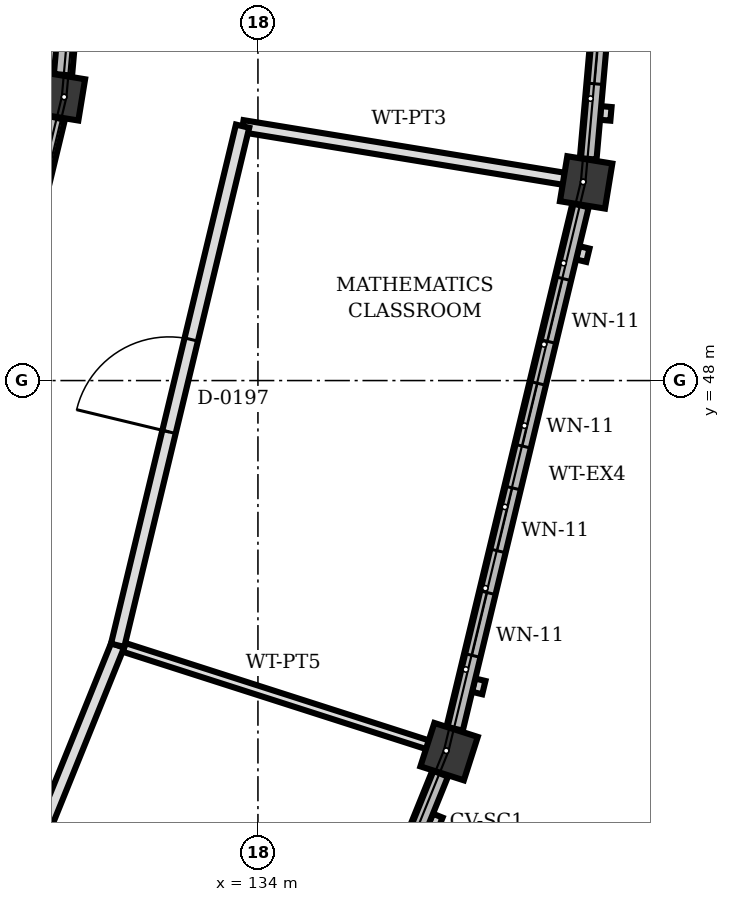
"""IFC4 building model, lengths in metres.
Left out: names, types, materials, properties, quantities, classifications, styles, units other than length and angle.
Written with IfcOpenShell. Run it as: python <this file> out.ifc"""

import sys

from ifc_helpers import new_model, si_unit, direction, frame, frame_2d, origin, origin_2d, place, context, subcontext, project, spatial, rectangle, extrude, element, fill, save


model = new_model("IFC4")
c1 = context("Model", 3, precision=1e-05, world=origin(), true_north=direction((0.0, 1.0)))
c2 = subcontext(c1, "Body", "Model", "MODEL_VIEW")
j1 = project(units=[si_unit("LENGTHUNIT", "METRE"), si_unit("PLANEANGLEUNIT", "RADIAN")], contexts=[c1])
p1 = place(None, origin())
s1 = spatial("IfcSite", under=j1, at=p1, CompositionType="ELEMENT")
p2 = place(p1, origin())
s2 = spatial("IfcBuilding", under=s1, at=p2, CompositionType="ELEMENT")
p3 = place(p2, frame((0.0, 0.0, 8.5)))
s3 = spatial("IfcBuildingStorey", under=s2, at=p3, CompositionType="ELEMENT", Elevation=8.5)
p4 = place(p3, frame((131.41, 51.737, 0.0), z_axis=(0.0, 0.0, 1.0), x_axis=(0.986889540988, -0.161397130983, 0.0)))
e1 = element("IfcColumn", 1, at=p4, inside=s3, PredefinedType="COLUMN", context=c2, shape_type="SweptSolid", body=[
    extrude(rectangle(XDim=0.55, YDim=0.55, at=origin_2d()), origin(), (0.0, 0.0, 1.0), 4.0),
])
for number, where, z_axis, x_axis in (
    (2, (136.515, 43.118, 0.0), (0.0, 0.0, 1.0), (0.952, -0.305, 0.0)),
    (3, (138.318, 50.607, 0.0), (0.0, 0.0, 1.0), (0.987, -0.161, 0.0)),
):
    element("IfcColumn", number, at=place(p3, frame(where, z_axis=z_axis, x_axis=x_axis)), inside=s3, PredefinedType="COLUMN", context=c2, shape_type="SweptSolid", body=[
        extrude(rectangle(XDim=0.6, YDim=0.6, at=origin_2d()), origin(), (0.0, 0.0, 1.0), 4.0),
    ])
p5 = place(p3, frame((136.398, 42.83, 0.0), z_axis=(0.0, 0.0, 1.0), x_axis=(-0.375031251377, -0.92701216847, 0.0)))
e4 = element("IfcWall", 4, at=p5, inside=s3, PredefinedType="SOLIDWALL", context=c2, shape_type="SweptSolid", body=[
    extrude(rectangle(XDim=7.082, YDim=0.22, at=frame_2d((3.541, 0.0))), origin(), (0.0, 0.0, 1.0), 3.192),
])
p6 = place(p5, frame((0.991, 0.0, 0.85)))
e5 = element("IfcOpeningElement", 5, at=p6, cuts=e4, PredefinedType="OPENING", context=c2, shape_type="SweptSolid", body=[
    extrude(rectangle(XDim=0.85, YDim=1.25, at=frame_2d((0.425, 0.625))), frame((0.0, 0.12, 0.0), z_axis=(0.0, -1.0, 0.0), x_axis=(1.0, 0.0, 0.0)), (0.0, 0.0, 1.0), 0.24),
])
p7 = place(p5, frame((2.408, 0.0, 0.85)))
e6 = element("IfcOpeningElement", 6, at=p7, cuts=e4, PredefinedType="OPENING", context=c2, shape_type="SweptSolid", body=[
    extrude(rectangle(XDim=0.85, YDim=1.25, at=frame_2d((0.425, 0.625))), frame((0.0, 0.12, 0.0), z_axis=(0.0, -1.0, 0.0), x_axis=(1.0, 0.0, 0.0)), (0.0, 0.0, 1.0), 0.24),
])
p8 = place(p5, frame((3.824, 0.0, 0.85)))
e7 = element("IfcOpeningElement", 7, at=p8, cuts=e4, PredefinedType="OPENING", context=c2, shape_type="SweptSolid", body=[
    extrude(rectangle(XDim=0.85, YDim=1.25, at=frame_2d((0.425, 0.625))), frame((0.0, 0.12, 0.0), z_axis=(0.0, -1.0, 0.0), x_axis=(1.0, 0.0, 0.0)), (0.0, 0.0, 1.0), 0.24),
])
p9 = place(p5, frame((5.241, 0.0, 0.85)))
e8 = element("IfcOpeningElement", 8, at=p9, cuts=e4, PredefinedType="OPENING", context=c2, shape_type="SweptSolid", body=[
    extrude(rectangle(XDim=0.85, YDim=1.25, at=frame_2d((0.425, 0.625))), frame((0.0, 0.12, 0.0), z_axis=(0.0, -1.0, 0.0), x_axis=(1.0, 0.0, 0.0)), (0.0, 0.0, 1.0), 0.24),
])
p10 = place(p3, frame((138.245, 50.305, 0.0), z_axis=(0.0, 0.0, 1.0), x_axis=(-0.234017027709, -0.972232498296, 0.0)))
e9 = element("IfcWall", 9, at=p10, inside=s3, PredefinedType="SOLIDWALL", context=c2, shape_type="SweptSolid", body=[
    extrude(rectangle(XDim=7.082, YDim=0.22, at=frame_2d((3.541, 0.0))), origin(), (0.0, 0.0, 1.0), 3.192),
])
p11 = place(p10, frame((0.991, 0.0, 0.85)))
e10 = element("IfcOpeningElement", 10, at=p11, cuts=e9, PredefinedType="OPENING", context=c2, shape_type="SweptSolid", body=[
    extrude(rectangle(XDim=0.85, YDim=1.25, at=frame_2d((0.425, 0.625))), frame((0.0, 0.12, 0.0), z_axis=(0.0, -1.0, 0.0), x_axis=(1.0, 0.0, 0.0)), (0.0, 0.0, 1.0), 0.24),
])
p12 = place(p10, frame((2.408, 0.0, 0.85)))
e11 = element("IfcOpeningElement", 11, at=p12, cuts=e9, PredefinedType="OPENING", context=c2, shape_type="SweptSolid", body=[
    extrude(rectangle(XDim=0.85, YDim=1.25, at=frame_2d((0.425, 0.625))), frame((0.0, 0.12, 0.0), z_axis=(0.0, -1.0, 0.0), x_axis=(1.0, 0.0, 0.0)), (0.0, 0.0, 1.0), 0.24),
])
p13 = place(p10, frame((3.824, 0.0, 0.85)))
e12 = element("IfcOpeningElement", 12, at=p13, cuts=e9, PredefinedType="OPENING", context=c2, shape_type="SweptSolid", body=[
    extrude(rectangle(XDim=0.85, YDim=1.25, at=frame_2d((0.425, 0.625))), frame((0.0, 0.12, 0.0), z_axis=(0.0, -1.0, 0.0), x_axis=(1.0, 0.0, 0.0)), (0.0, 0.0, 1.0), 0.24),
])
p14 = place(p10, frame((5.24, 0.0, 0.85)))
e13 = element("IfcOpeningElement", 13, at=p14, cuts=e9, PredefinedType="OPENING", context=c2, shape_type="SweptSolid", body=[
    extrude(rectangle(XDim=0.85, YDim=1.25, at=frame_2d((0.425, 0.625))), frame((0.0, 0.12, 0.0), z_axis=(0.0, -1.0, 0.0), x_axis=(1.0, 0.0, 0.0)), (0.0, 0.0, 1.0), 0.24),
])
p15 = place(p3, frame((129.917, 45.535, 0.0), z_axis=(0.0, 0.0, 1.0), x_axis=(0.234068568922, 0.972220090845, 0.0)))
e14 = element("IfcWall", 14, at=p15, inside=s3, PredefinedType="SOLIDWALL", context=c2, shape_type="SweptSolid", body=[
    extrude(rectangle(XDim=6.092, YDim=0.24, at=frame_2d((3.046, 0.0))), origin(), (0.0, 0.0, 1.0), 3.05),
])
p16 = place(p15, frame((2.446, 0.0, 2.05)))
e15 = element("IfcOpeningElement", 15, at=p16, cuts=e14, PredefinedType="OPENING", context=c2, shape_type="SweptSolid", body=[
    extrude(rectangle(XDim=1.2, YDim=0.85, at=frame_2d((0.6, 0.425))), frame((0.0, 0.13, 0.0), z_axis=(0.0, -1.0, 0.0), x_axis=(1.0, 0.0, 0.0)), (0.0, 0.0, 1.0), 0.26),
])
p17 = place(p3, frame((138.968, 57.971, 0.0), z_axis=(0.0, 0.0, 1.0), x_axis=(-0.08798335938, -0.996121944579, 0.0)))
e16 = element("IfcWall", 16, at=p17, inside=s3, PredefinedType="SOLIDWALL", context=c2, shape_type="SweptSolid", body=[
    extrude(rectangle(XDim=7.081, YDim=0.22, at=frame_2d((3.541, 0.0))), origin(), (0.0, 0.0, 1.0), 3.192),
])
p18 = place(p17, frame((0.991, 0.0, 0.85)))
e17 = element("IfcOpeningElement", 17, at=p18, cuts=e16, PredefinedType="OPENING", context=c2, shape_type="SweptSolid", body=[
    extrude(rectangle(XDim=0.85, YDim=1.25, at=frame_2d((0.425, 0.625))), frame((0.0, 0.12, 0.0), z_axis=(0.0, -1.0, 0.0), x_axis=(1.0, 0.0, 0.0)), (0.0, 0.0, 1.0), 0.24),
])
p19 = place(p17, frame((3.824, 0.0, 0.85)))
e18 = element("IfcOpeningElement", 18, at=p19, cuts=e16, PredefinedType="OPENING", context=c2, shape_type="SweptSolid", body=[
    extrude(rectangle(XDim=0.85, YDim=1.25, at=frame_2d((0.425, 0.625))), frame((0.0, 0.12, 0.0), z_axis=(0.0, -1.0, 0.0), x_axis=(1.0, 0.0, 0.0)), (0.0, 0.0, 1.0), 0.24),
])
p20 = place(p17, frame((5.24, 0.0, 0.85)))
e19 = element("IfcOpeningElement", 19, at=p20, cuts=e16, PredefinedType="OPENING", context=c2, shape_type="SweptSolid", body=[
    extrude(rectangle(XDim=0.85, YDim=1.25, at=frame_2d((0.425, 0.625))), frame((0.0, 0.12, 0.0), z_axis=(0.0, -1.0, 0.0), x_axis=(1.0, 0.0, 0.0)), (0.0, 0.0, 1.0), 0.24),
])
p21 = place(p3, frame((131.435, 52.023, 0.0), z_axis=(0.0, 0.0, 1.0), x_axis=(0.087955791154, 0.996124379183, 0.0)))
e20 = element("IfcWall", 20, at=p21, inside=s3, PredefinedType="SOLIDWALL", context=c2, shape_type="SweptSolid", body=[
    extrude(rectangle(XDim=6.093, YDim=0.24, at=frame_2d((3.046, 0.0))), origin(), (0.0, 0.0, 1.0), 3.05),
])
p22 = place(p21, frame((2.446, 0.0, 2.05)))
e21 = element("IfcOpeningElement", 21, at=p22, cuts=e20, PredefinedType="OPENING", context=c2, shape_type="SweptSolid", body=[
    extrude(rectangle(XDim=1.2, YDim=0.85, at=frame_2d((0.6, 0.425))), frame((0.0, 0.13, 0.0), z_axis=(0.0, -1.0, 0.0), x_axis=(1.0, 0.0, 0.0)), (0.0, 0.0, 1.0), 0.26),
])
p23 = place(p3, frame((132.154, 44.517, 0.0), z_axis=(0.0, 0.0, 1.0), x_axis=(0.952187193994, -0.305515216633, 0.0)))
e22 = element("IfcWall", 22, at=p23, inside=s3, PredefinedType="PARTITIONING", context=c2, shape_type="SweptSolid", body=[
    extrude(rectangle(XDim=4.288, YDim=0.12, at=frame_2d((2.144, 0.0))), origin(), (0.0, 0.0, 1.0), 3.092),
])
p24 = place(p3, frame((133.798, 51.347, 0.0), z_axis=(0.0, 0.0, 1.0), x_axis=(0.986860722003, -0.161573250781, 0.0)))
e23 = element("IfcWall", 23, at=p24, inside=s3, PredefinedType="PARTITIONING", context=c2, shape_type="SweptSolid", body=[
    extrude(rectangle(XDim=4.288, YDim=0.16, at=frame_2d((2.144, 0.0))), origin(), (0.0, 0.0, 1.0), 3.092),
])
p25 = place(p3, frame((129.519, 38.004, 0.0), z_axis=(0.0, 0.0, 1.0), x_axis=(0.375036360506, 0.927010101508, 0.0)))
e24 = element("IfcWall", 24, at=p25, inside=s3, PredefinedType="PARTITIONING", context=c2, shape_type="SweptSolid", body=[
    extrude(rectangle(XDim=7.026, YDim=0.18, at=frame_2d((3.513, 0.0))), origin(), (0.0, 0.0, 1.0), 3.092),
])
p26 = place(p25, frame((3.023, 0.0, 0.0)))
e25 = element("IfcOpeningElement", 25, at=p26, cuts=e24, PredefinedType="OPENING", context=c2, shape_type="SweptSolid", body=[
    extrude(rectangle(XDim=0.98, YDim=2.2, at=frame_2d((0.49, 1.1))), frame((0.0, 0.1, 0.0), z_axis=(0.0, -1.0, 0.0), x_axis=(1.0, 0.0, 0.0)), (0.0, 0.0, 1.0), 0.2),
])
p27 = place(p3, frame((132.154, 44.517, 0.0), z_axis=(0.0, 0.0, 1.0), x_axis=(0.234030113745, 0.972229348385, 0.0)))
e26 = element("IfcWall", 26, at=p27, inside=s3, PredefinedType="PARTITIONING", context=c2, shape_type="SweptSolid", body=[
    extrude(rectangle(XDim=7.025, YDim=0.18, at=frame_2d((3.512, 0.0))), origin(), (0.0, 0.0, 1.0), 3.092),
])
p28 = place(p27, frame((2.888, 0.0, 0.0)))
e27 = element("IfcOpeningElement", 27, at=p28, cuts=e26, PredefinedType="OPENING", context=c2, shape_type="SweptSolid", body=[
    extrude(rectangle(XDim=1.25, YDim=2.2, at=frame_2d((0.625, 1.1))), frame((0.0, 0.1, 0.0), z_axis=(0.0, -1.0, 0.0), x_axis=(1.0, 0.0, 0.0)), (0.0, 0.0, 1.0), 0.2),
])
p29 = place(p11, origin())
e28 = element("IfcWindow", 28, at=p29, inside=s3, PartitioningType="SINGLE_PANEL", PredefinedType="WINDOW", context=c2, shape_type="SweptSolid", body=[
    extrude(rectangle(XDim=0.85, YDim=1.25, at=frame_2d((0.425, 0.625))), frame((0.0, 0.03, 0.0), z_axis=(0.0, -1.0, 0.0), x_axis=(1.0, 0.0, 0.0)), (0.0, 0.0, 1.0), 0.06),
])
fill(e10, e28)
p30 = place(p12, origin())
e29 = element("IfcWindow", 29, at=p30, inside=s3, PartitioningType="SINGLE_PANEL", PredefinedType="WINDOW", context=c2, shape_type="SweptSolid", body=[
    extrude(rectangle(XDim=0.85, YDim=1.25, at=frame_2d((0.425, 0.625))), frame((0.0, 0.03, 0.0), z_axis=(0.0, -1.0, 0.0), x_axis=(1.0, 0.0, 0.0)), (0.0, 0.0, 1.0), 0.06),
])
fill(e11, e29)
p31 = place(p13, origin())
e30 = element("IfcWindow", 30, at=p31, inside=s3, PartitioningType="SINGLE_PANEL", PredefinedType="WINDOW", context=c2, shape_type="SweptSolid", body=[
    extrude(rectangle(XDim=0.85, YDim=1.25, at=frame_2d((0.425, 0.625))), frame((0.0, 0.03, 0.0), z_axis=(0.0, -1.0, 0.0), x_axis=(1.0, 0.0, 0.0)), (0.0, 0.0, 1.0), 0.06),
])
fill(e12, e30)
p32 = place(p14, origin())
e31 = element("IfcWindow", 31, at=p32, inside=s3, PartitioningType="SINGLE_PANEL", PredefinedType="WINDOW", context=c2, shape_type="SweptSolid", body=[
    extrude(rectangle(XDim=0.85, YDim=1.25, at=frame_2d((0.425, 0.625))), frame((0.0, 0.03, 0.0), z_axis=(0.0, -1.0, 0.0), x_axis=(1.0, 0.0, 0.0)), (0.0, 0.0, 1.0), 0.06),
])
fill(e13, e31)
p33 = place(p20, origin())
e32 = element("IfcWindow", 32, at=p33, inside=s3, PartitioningType="SINGLE_PANEL", PredefinedType="WINDOW", context=c2, shape_type="SweptSolid", body=[
    extrude(rectangle(XDim=0.85, YDim=1.25, at=frame_2d((0.425, 0.625))), frame((0.0, 0.03, 0.0), z_axis=(0.0, -1.0, 0.0), x_axis=(1.0, 0.0, 0.0)), (0.0, 0.0, 1.0), 0.06),
])
fill(e19, e32)
p34 = place(p28, origin())
e33 = element("IfcDoor", 33, at=p34, inside=s3, OperationType="SINGLE_SWING_LEFT", PredefinedType="DOOR", context=c2, shape_type="SweptSolid", body=[
    extrude(rectangle(XDim=1.25, YDim=2.2, at=frame_2d((0.625, 1.1))), frame((0.0, 0.025, 0.0), z_axis=(0.0, -1.0, 0.0), x_axis=(1.0, 0.0, 0.0)), (0.0, 0.0, 1.0), 0.05),
])
fill(e27, e33)
save(model, sys.argv[1])
